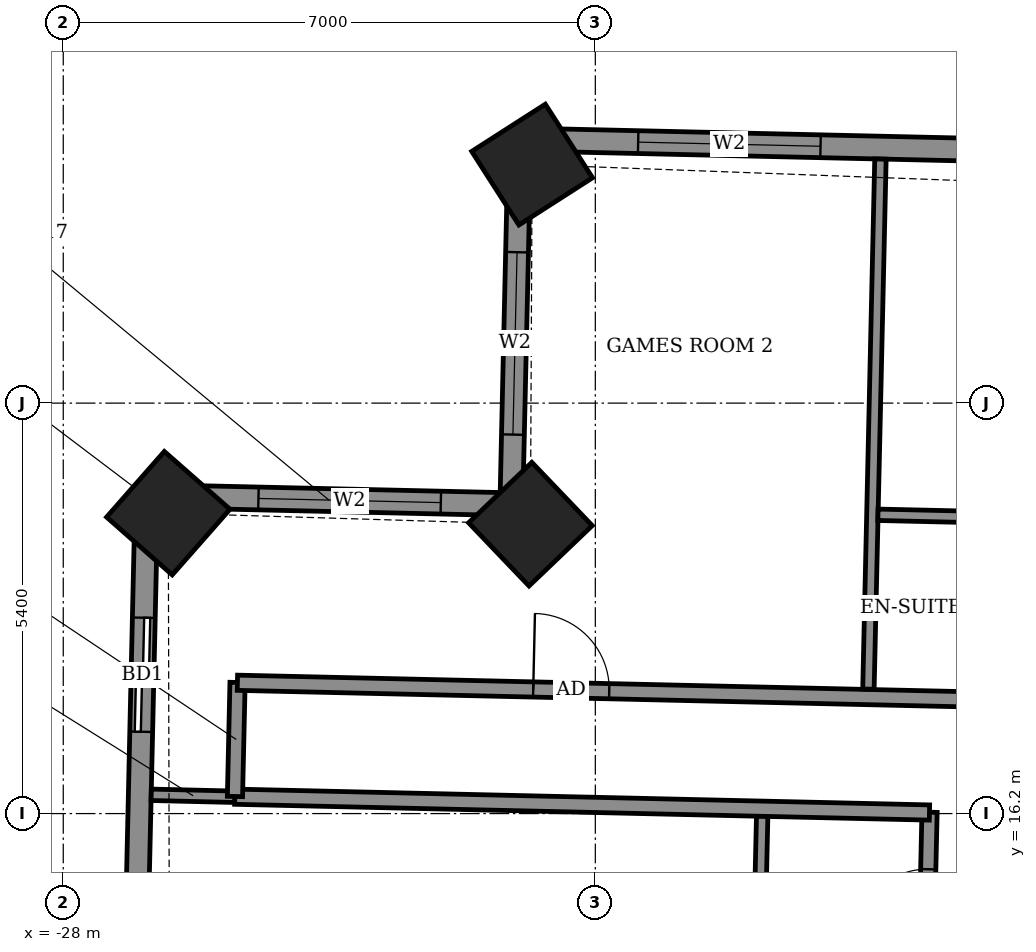
"""IFC4 building model, lengths in metres.
Left out: names, types, materials, properties, quantities, classifications, styles, units other than length and angle.
Written with IfcOpenShell. Run it as: python <this file> out.ifc"""

import sys

from ifc_helpers import new_model, si_unit, direction, frame, frame_2d, origin, origin_2d, place, context, subcontext, project, spatial, rectangle, extrude, element, fill, save


model = new_model("IFC4")
c1 = context("Model", 3, precision=1e-05, world=origin(), true_north=direction((0.0, 1.0)))
c2 = subcontext(c1, "Body", "Model", "MODEL_VIEW")
j1 = project(units=[si_unit("LENGTHUNIT", "METRE"), si_unit("PLANEANGLEUNIT", "RADIAN")], contexts=[c1])
p1 = place(None, origin())
s1 = spatial("IfcSite", under=j1, at=p1, CompositionType="ELEMENT")
p2 = place(p1, origin())
s2 = spatial("IfcBuilding", under=s1, at=p2, CompositionType="ELEMENT")
p3 = place(p2, frame((0.0, 0.0, 197.9)))
s3 = spatial("IfcBuildingStorey", under=s2, at=p3, CompositionType="ELEMENT", Elevation=197.9)
for number, where, z_axis, x_axis in (
    (1, (-21.832, 24.738, -0.55), (0.0, 0.0, 1.0), (-0.842, -0.54, 0.0)),
    (2, (-21.854, 20.007, -0.55), (0.0, 0.0, 1.0), (-0.723, -0.691, 0.0)),
    (3, (-26.618, 20.152, -0.55), (0.0, 0.0, 1.0), (-0.661, -0.751, 0.0)),
):
    element("IfcColumn", number, at=place(p3, frame(where, z_axis=z_axis, x_axis=x_axis)), inside=s3, PredefinedType="COLUMN", context=c2, shape_type="SweptSolid", body=[
        extrude(rectangle(XDim=1.15, YDim=1.15, at=origin_2d()), origin(), (0.0, 0.0, 1.0), 3.6),
    ])
p4 = place(p3, frame((20.437, 24.106, 0.0), z_axis=(0.0, 0.0, 1.0), x_axis=(-0.999742506232, 0.022691875925, 0.0)))
e4 = element("IfcWall", 4, at=p4, inside=s3, PredefinedType="SOLIDWALL", context=c2, shape_type="SweptSolid", body=[
    extrude(rectangle(XDim=42.444, YDim=0.3, at=frame_2d((21.222, 0.0))), origin(), (0.0, 0.0, 1.0), 3.05),
])
p5 = place(p4, frame((2.287, 0.0, 0.0)))
e5 = element("IfcOpeningElement", 5, at=p5, cuts=e4, PredefinedType="OPENING", context=c2, shape_type="SweptSolid", body=[
    extrude(rectangle(XDim=1.5, YDim=2.4, at=frame_2d((0.75, 1.2))), frame((0.0, 0.16, 0.0), z_axis=(0.0, -1.0, 0.0), x_axis=(1.0, 0.0, 0.0)), (0.0, 0.0, 1.0), 0.32),
])
p6 = place(p4, frame((7.947, 0.0, 0.0)))
e6 = element("IfcOpeningElement", 6, at=p6, cuts=e4, PredefinedType="OPENING", context=c2, shape_type="SweptSolid", body=[
    extrude(rectangle(XDim=1.5, YDim=2.4, at=frame_2d((0.75, 1.2))), frame((0.0, 0.16, 0.0), z_axis=(0.0, -1.0, 0.0), x_axis=(1.0, 0.0, 0.0)), (0.0, 0.0, 1.0), 0.32),
])
p7 = place(p4, frame((11.184, 0.0, 0.0)))
e7 = element("IfcOpeningElement", 7, at=p7, cuts=e4, PredefinedType="OPENING", context=c2, shape_type="SweptSolid", body=[
    extrude(rectangle(XDim=1.5, YDim=2.4, at=frame_2d((0.75, 1.2))), frame((0.0, 0.16, 0.0), z_axis=(0.0, -1.0, 0.0), x_axis=(1.0, 0.0, 0.0)), (0.0, 0.0, 1.0), 0.32),
])
p8 = place(p4, frame((16.469, 0.0, 0.0)))
e8 = element("IfcOpeningElement", 8, at=p8, cuts=e4, PredefinedType="OPENING", context=c2, shape_type="SweptSolid", body=[
    extrude(rectangle(XDim=1.5, YDim=2.4, at=frame_2d((0.75, 1.2))), frame((0.0, 0.16, 0.0), z_axis=(0.0, -1.0, 0.0), x_axis=(1.0, 0.0, 0.0)), (0.0, 0.0, 1.0), 0.32),
])
p9 = place(p4, frame((22.02, 0.0, 0.0)))
e9 = element("IfcOpeningElement", 9, at=p9, cuts=e4, PredefinedType="OPENING", context=c2, shape_type="SweptSolid", body=[
    extrude(rectangle(XDim=1.5, YDim=2.4, at=frame_2d((0.75, 1.2))), frame((0.0, 0.16, 0.0), z_axis=(0.0, -1.0, 0.0), x_axis=(1.0, 0.0, 0.0)), (0.0, 0.0, 1.0), 0.32),
])
p10 = place(p4, frame((25.257, 0.0, 0.0)))
e10 = element("IfcOpeningElement", 10, at=p10, cuts=e4, PredefinedType="OPENING", context=c2, shape_type="SweptSolid", body=[
    extrude(rectangle(XDim=1.5, YDim=2.4, at=frame_2d((0.75, 1.2))), frame((0.0, 0.16, 0.0), z_axis=(0.0, -1.0, 0.0), x_axis=(1.0, 0.0, 0.0)), (0.0, 0.0, 1.0), 0.32),
])
p11 = place(p4, frame((30.057, 0.0, 0.0)))
e11 = element("IfcOpeningElement", 11, at=p11, cuts=e4, PredefinedType="OPENING", context=c2, shape_type="SweptSolid", body=[
    extrude(rectangle(XDim=1.5, YDim=2.4, at=frame_2d((0.75, 1.2))), frame((0.0, 0.16, 0.0), z_axis=(0.0, -1.0, 0.0), x_axis=(1.0, 0.0, 0.0)), (0.0, 0.0, 1.0), 0.32),
])
p12 = place(p4, frame((33.294, 0.0, 0.0)))
e12 = element("IfcOpeningElement", 12, at=p12, cuts=e4, PredefinedType="OPENING", context=c2, shape_type="SweptSolid", body=[
    extrude(rectangle(XDim=1.5, YDim=2.4, at=frame_2d((0.75, 1.2))), frame((0.0, 0.16, 0.0), z_axis=(0.0, -1.0, 0.0), x_axis=(1.0, 0.0, 0.0)), (0.0, 0.0, 1.0), 0.32),
])
p13 = place(p4, frame((38.484, 0.0, 0.9)))
e13 = element("IfcOpeningElement", 13, at=p13, cuts=e4, PredefinedType="OPENING", context=c2, shape_type="SweptSolid", body=[
    extrude(rectangle(XDim=2.4, YDim=1.5, at=frame_2d((1.2, 0.75))), frame((0.0, 0.16, 0.0), z_axis=(0.0, -1.0, 0.0), x_axis=(1.0, 0.0, 0.0)), (0.0, 0.0, 1.0), 0.32),
])
p14 = place(p3, frame((-21.996, 25.069, 0.0), z_axis=(0.0, 0.0, 1.0), x_axis=(-0.022683280499, -0.999742701292, 0.0)))
e14 = element("IfcWall", 14, at=p14, inside=s3, PredefinedType="SOLIDWALL", context=c2, shape_type="SweptSolid", body=[
    extrude(rectangle(XDim=4.8, YDim=0.3, at=frame_2d((2.4, 0.0))), origin(), (0.0, 0.0, 1.0), 2.55),
])
p15 = place(p14, frame((1.484, 0.0, 0.9)))
e15 = element("IfcOpeningElement", 15, at=p15, cuts=e14, PredefinedType="OPENING", context=c2, shape_type="SweptSolid", body=[
    extrude(rectangle(XDim=2.4, YDim=1.5, at=frame_2d((1.2, 0.75))), frame((0.0, 0.16, 0.0), z_axis=(0.0, -1.0, 0.0), x_axis=(1.0, 0.0, 0.0)), (0.0, 0.0, 1.0), 0.32),
])
p16 = place(p3, frame((-22.105, 20.27, 0.0), z_axis=(0.0, 0.0, 1.0), x_axis=(-0.999742701292, 0.022683280499, 0.0)))
e16 = element("IfcWall", 16, at=p16, inside=s3, PredefinedType="SOLIDWALL", context=c2, shape_type="SweptSolid", body=[
    extrude(rectangle(XDim=4.8, YDim=0.3, at=frame_2d((2.4, 0.0))), origin(), (0.0, 0.0, 1.0), 2.55),
])
p17 = place(p16, frame((0.928, 0.0, 0.9)))
e17 = element("IfcOpeningElement", 17, at=p17, cuts=e16, PredefinedType="OPENING", context=c2, shape_type="SweptSolid", body=[
    extrude(rectangle(XDim=2.4, YDim=1.5, at=frame_2d((1.2, 0.75))), frame((0.0, 0.16, 0.0), z_axis=(0.0, -1.0, 0.0), x_axis=(1.0, 0.0, 0.0)), (0.0, 0.0, 1.0), 0.32),
])
p18 = place(p3, frame((-26.904, 20.379, 0.0), z_axis=(0.0, 0.0, 1.0), x_axis=(-0.022669030322, -0.999743024514, 0.0)))
e18 = element("IfcWall", 18, at=p18, inside=s3, PredefinedType="SOLIDWALL", context=c2, shape_type="SweptSolid", body=[
    extrude(rectangle(XDim=11.33, YDim=0.3, at=frame_2d((5.665, 0.0))), origin(), (0.0, 0.0, 1.0), 2.55),
])
p19 = place(p18, frame((1.603, 0.0, 0.0)))
e19 = element("IfcOpeningElement", 19, at=p19, cuts=e18, PredefinedType="OPENING", context=c2, shape_type="SweptSolid", body=[
    extrude(rectangle(XDim=1.5, YDim=2.4, at=frame_2d((0.75, 1.2))), frame((0.0, 0.16, 0.0), z_axis=(0.0, -1.0, 0.0), x_axis=(1.0, 0.0, 0.0)), (0.0, 0.0, 1.0), 0.32),
])
p20 = place(p18, frame((7.218, 0.0, 0.9)))
e20 = element("IfcOpeningElement", 20, at=p20, cuts=e18, PredefinedType="OPENING", context=c2, shape_type="SweptSolid", body=[
    extrude(rectangle(XDim=2.4, YDim=1.5, at=frame_2d((1.2, 0.75))), frame((0.0, 0.16, 0.0), z_axis=(0.0, -1.0, 0.0), x_axis=(1.0, 0.0, 0.0)), (0.0, 0.0, 1.0), 0.32),
])
p21 = place(p3, frame((-17.247, -12.149, 0.0), z_axis=(0.0, 0.0, 1.0), x_axis=(0.022698146637, 0.999742363881, 0.0)))
e21 = element("IfcWall", 21, at=p21, inside=s3, PredefinedType="PARTITIONING", context=c2, shape_type="SweptSolid", body=[
    extrude(rectangle(XDim=28.374, YDim=0.2, at=frame_2d((14.187, 0.0))), origin(), (0.0, 0.0, 1.0), 3.05),
])
p22 = place(p21, frame((23.0, 0.0, 0.0)))
e22 = element("IfcOpeningElement", 22, at=p22, cuts=e21, PredefinedType="OPENING", context=c2, shape_type="SweptSolid", body=[
    extrude(rectangle(XDim=1.0, YDim=2.1, at=frame_2d((0.5, 1.05))), frame((0.0, 0.11, 0.0), z_axis=(0.0, -1.0, 0.0), x_axis=(1.0, 0.0, 0.0)), (0.0, 0.0, 1.0), 0.22),
])
p23 = place(p21, frame((26.724, 0.0, 0.0)))
e23 = element("IfcOpeningElement", 23, at=p23, cuts=e21, PredefinedType="OPENING", context=c2, shape_type="SweptSolid", body=[
    extrude(rectangle(XDim=0.9, YDim=2.1, at=frame_2d((0.45, 1.05))), frame((0.0, 0.11, 0.0), z_axis=(0.0, -1.0, 0.0), x_axis=(1.0, 0.0, 0.0)), (0.0, 0.0, 1.0), 0.22),
])
p24 = place(p21, frame((17.025, 0.0, 0.0)))
e24 = element("IfcOpeningElement", 24, at=p24, cuts=e21, PredefinedType="OPENING", context=c2, shape_type="SweptSolid", body=[
    extrude(rectangle(XDim=1.0, YDim=2.1, at=frame_2d((0.5, 1.05))), frame((0.0, 0.11, 0.0), z_axis=(0.0, -1.0, 0.0), x_axis=(1.0, 0.0, 0.0)), (0.0, 0.0, 1.0), 0.22),
])
p25 = place(p21, frame((19.275, 0.0, 0.0)))
e25 = element("IfcOpeningElement", 25, at=p25, cuts=e21, PredefinedType="OPENING", context=c2, shape_type="SweptSolid", body=[
    extrude(rectangle(XDim=0.9, YDim=2.1, at=frame_2d((0.45, 1.05))), frame((0.0, 0.11, 0.0), z_axis=(0.0, -1.0, 0.0), x_axis=(1.0, 0.0, 0.0)), (0.0, 0.0, 1.0), 0.22),
])
p26 = place(p21, frame((14.95, 0.0, 0.0)))
e26 = element("IfcOpeningElement", 26, at=p26, cuts=e21, PredefinedType="OPENING", context=c2, shape_type="SweptSolid", body=[
    extrude(rectangle(XDim=1.0, YDim=2.1, at=frame_2d((0.5, 1.05))), frame((0.0, 0.11, 0.0), z_axis=(0.0, -1.0, 0.0), x_axis=(1.0, 0.0, 0.0)), (0.0, 0.0, 1.0), 0.22),
])
p27 = place(p21, frame((12.625, 0.0, 0.0)))
e27 = element("IfcOpeningElement", 27, at=p27, cuts=e21, PredefinedType="OPENING", context=c2, shape_type="SweptSolid", body=[
    extrude(rectangle(XDim=0.9, YDim=2.1, at=frame_2d((0.45, 1.05))), frame((0.0, 0.11, 0.0), z_axis=(0.0, -1.0, 0.0), x_axis=(1.0, 0.0, 0.0)), (0.0, 0.0, 1.0), 0.22),
])
p28 = place(p21, frame((10.275, 0.0, 0.0)))
e28 = element("IfcOpeningElement", 28, at=p28, cuts=e21, PredefinedType="OPENING", context=c2, shape_type="SweptSolid", body=[
    extrude(rectangle(XDim=1.0, YDim=2.1, at=frame_2d((0.5, 1.05))), frame((0.0, 0.11, 0.0), z_axis=(0.0, -1.0, 0.0), x_axis=(1.0, 0.0, 0.0)), (0.0, 0.0, 1.0), 0.22),
])
p29 = place(p21, frame((8.025, 0.0, 0.0)))
e29 = element("IfcOpeningElement", 29, at=p29, cuts=e21, PredefinedType="OPENING", context=c2, shape_type="SweptSolid", body=[
    extrude(rectangle(XDim=0.9, YDim=2.1, at=frame_2d((0.45, 1.05))), frame((0.0, 0.11, 0.0), z_axis=(0.0, -1.0, 0.0), x_axis=(1.0, 0.0, 0.0)), (0.0, 0.0, 1.0), 0.22),
])
p30 = place(p21, frame((4.337, 0.0, 0.0)))
e30 = element("IfcOpeningElement", 30, at=p30, cuts=e21, PredefinedType="OPENING", context=c2, shape_type="SweptSolid", body=[
    extrude(rectangle(XDim=1.0, YDim=2.1, at=frame_2d((0.5, 1.05))), frame((0.0, 0.11, 0.0), z_axis=(0.0, -1.0, 0.0), x_axis=(1.0, 0.0, 0.0)), (0.0, 0.0, 1.0), 0.22),
])
p31 = place(p21, frame((0.75, 0.0, 0.0)))
e31 = element("IfcOpeningElement", 31, at=p31, cuts=e21, PredefinedType="OPENING", context=c2, shape_type="SweptSolid", body=[
    extrude(rectangle(XDim=0.9, YDim=2.1, at=frame_2d((0.45, 1.05))), frame((0.0, 0.11, 0.0), z_axis=(0.0, -1.0, 0.0), x_axis=(1.0, 0.0, 0.0)), (0.0, 0.0, 1.0), 0.22),
])
p32 = place(p3, frame((-18.857, 13.869, 0.0), z_axis=(0.0, 0.0, 1.0), x_axis=(0.022612884682, 0.999744296031, 0.0)))
e32 = element("IfcWall", 32, at=p32, inside=s3, PredefinedType="PARTITIONING", context=c2, shape_type="SweptSolid", body=[
    extrude(rectangle(XDim=2.3, YDim=0.15, at=frame_2d((1.15, 0.0))), origin(), (0.0, 0.0, 1.0), 3.05),
])
p33 = place(p3, frame((-26.843, 16.447, 0.0), z_axis=(0.0, 0.0, 1.0), x_axis=(0.999720170098, -0.023655475055, 0.0)))
e33 = element("IfcWall", 33, at=p33, inside=s3, PredefinedType="PARTITIONING", context=c2, shape_type="SweptSolid", body=[
    extrude(rectangle(XDim=1.104, YDim=0.15, at=frame_2d((0.552, 0.0))), origin(), (0.0, 0.0, 1.0), 2.55),
])
p34 = place(p3, frame((-25.743, 16.422, 0.0), z_axis=(0.0, 0.0, 1.0), x_axis=(0.999741076645, -0.022754772455, 0.0)))
e34 = element("IfcWall", 34, at=p34, inside=s3, PredefinedType="PARTITIONING", context=c2, shape_type="SweptSolid", body=[
    extrude(rectangle(XDim=9.141, YDim=0.2, at=frame_2d((4.571, 0.0))), origin(), (0.0, 0.0, 1.0), 3.05),
])
p35 = place(p3, frame((-25.741, 16.425, 0.0), z_axis=(0.0, 0.0, 1.0), x_axis=(0.022617910375, 0.999744182344, 0.0)))
e35 = element("IfcWall", 35, at=p35, inside=s3, PredefinedType="PARTITIONING", context=c2, shape_type="SweptSolid", body=[
    extrude(rectangle(XDim=1.5, YDim=0.2, at=frame_2d((0.75, 0.0))), origin(), (0.0, 0.0, 1.0), 3.05),
])
p36 = place(p3, frame((-25.709, 17.921, 0.0), z_axis=(0.0, 0.0, 1.0), x_axis=(0.999742764922, -0.022680475901, 0.0)))
e36 = element("IfcWall", 36, at=p36, inside=s3, PredefinedType="PARTITIONING", context=c2, shape_type="SweptSolid", body=[
    extrude(rectangle(XDim=10.84, YDim=0.2, at=frame_2d((5.42, 0.0))), origin(), (0.0, 0.0, 1.0), 3.05),
])
p37 = place(p36, frame((3.893, 0.0, 0.0)))
e37 = element("IfcOpeningElement", 37, at=p37, cuts=e36, PredefinedType="OPENING", context=c2, shape_type="SweptSolid", body=[
    extrude(rectangle(XDim=1.0, YDim=2.1, at=frame_2d((0.5, 1.05))), frame((0.0, 0.11, 0.0), z_axis=(0.0, -1.0, 0.0), x_axis=(1.0, 0.0, 0.0)), (0.0, 0.0, 1.0), 0.22),
])
p38 = place(p3, frame((-17.407, 17.837, 0.0), z_axis=(0.0, 0.0, 1.0), x_axis=(0.022643496158, 0.999743603171, 0.0)))
e38 = element("IfcWall", 38, at=p38, inside=s3, PredefinedType="PARTITIONING", context=c2, shape_type="SweptSolid", body=[
    extrude(rectangle(XDim=6.976, YDim=0.15, at=frame_2d((3.488, 0.0))), origin(), (0.0, 0.0, 1.0), 2.55),
])
p39 = place(p3, frame((-17.282, 20.131, 0.0), z_axis=(0.0, 0.0, 1.0), x_axis=(0.999738082346, -0.022885950011, 0.0)))
e39 = element("IfcWall", 39, at=p39, inside=s3, PredefinedType="PARTITIONING", context=c2, shape_type="SweptSolid", body=[
    extrude(rectangle(XDim=2.325, YDim=0.15, at=frame_2d((1.163, 0.0))), origin(), (0.0, 0.0, 1.0), 3.05),
])
p40 = place(p13, origin())
e40 = element("IfcWindow", 40, at=p40, inside=s3, PartitioningType="DOUBLE_PANEL_VERTICAL", PredefinedType="WINDOW", context=c2, shape_type="SweptSolid", body=[
    extrude(rectangle(XDim=2.4, YDim=1.5, at=frame_2d((1.2, 0.75))), frame((0.0, 0.03, 0.0), z_axis=(0.0, -1.0, 0.0), x_axis=(1.0, 0.0, 0.0)), (0.0, 0.0, 1.0), 0.06),
])
fill(e13, e40)
p41 = place(p15, origin())
e41 = element("IfcWindow", 41, at=p41, inside=s3, PartitioningType="DOUBLE_PANEL_VERTICAL", PredefinedType="WINDOW", context=c2, shape_type="SweptSolid", body=[
    extrude(rectangle(XDim=2.4, YDim=1.5, at=frame_2d((1.2, 0.75))), frame((0.0, 0.03, 0.0), z_axis=(0.0, -1.0, 0.0), x_axis=(1.0, 0.0, 0.0)), (0.0, 0.0, 1.0), 0.06),
])
fill(e15, e41)
p42 = place(p17, origin())
e42 = element("IfcWindow", 42, at=p42, inside=s3, PartitioningType="DOUBLE_PANEL_VERTICAL", PredefinedType="WINDOW", context=c2, shape_type="SweptSolid", body=[
    extrude(rectangle(XDim=2.4, YDim=1.5, at=frame_2d((1.2, 0.75))), frame((0.0, 0.03, 0.0), z_axis=(0.0, -1.0, 0.0), x_axis=(1.0, 0.0, 0.0)), (0.0, 0.0, 1.0), 0.06),
])
fill(e17, e42)
p43 = place(p19, origin())
e43 = element("IfcDoor", 43, at=p43, inside=s3, OperationType="SLIDING_TO_LEFT", PredefinedType="DOOR", context=c2, shape_type="SweptSolid", body=[
    extrude(rectangle(XDim=1.5, YDim=2.4, at=frame_2d((0.75, 1.2))), frame((0.0, 0.025, 0.0), z_axis=(0.0, -1.0, 0.0), x_axis=(1.0, 0.0, 0.0)), (0.0, 0.0, 1.0), 0.05),
])
fill(e19, e43)
p44 = place(p37, origin())
e44 = element("IfcDoor", 44, at=p44, inside=s3, OperationType="SINGLE_SWING_RIGHT", PredefinedType="DOOR", context=c2, shape_type="SweptSolid", body=[
    extrude(rectangle(XDim=1.0, YDim=2.1, at=frame_2d((0.5, 1.05))), frame((0.0, 0.025, 0.0), z_axis=(0.0, -1.0, 0.0), x_axis=(1.0, 0.0, 0.0)), (0.0, 0.0, 1.0), 0.05),
])
fill(e37, e44)
p45 = place(p23, origin())
e45 = element("IfcDoor", 45, at=p45, inside=s3, OperationType="SINGLE_SWING_RIGHT", PredefinedType="DOOR", context=c2, shape_type="SweptSolid", body=[
    extrude(rectangle(XDim=0.9, YDim=2.1, at=frame_2d((0.45, 1.05))), frame((0.0, 0.025, 0.0), z_axis=(0.0, -1.0, 0.0), x_axis=(1.0, 0.0, 0.0)), (0.0, 0.0, 1.0), 0.05),
])
fill(e23, e45)
save(model, sys.argv[1])
